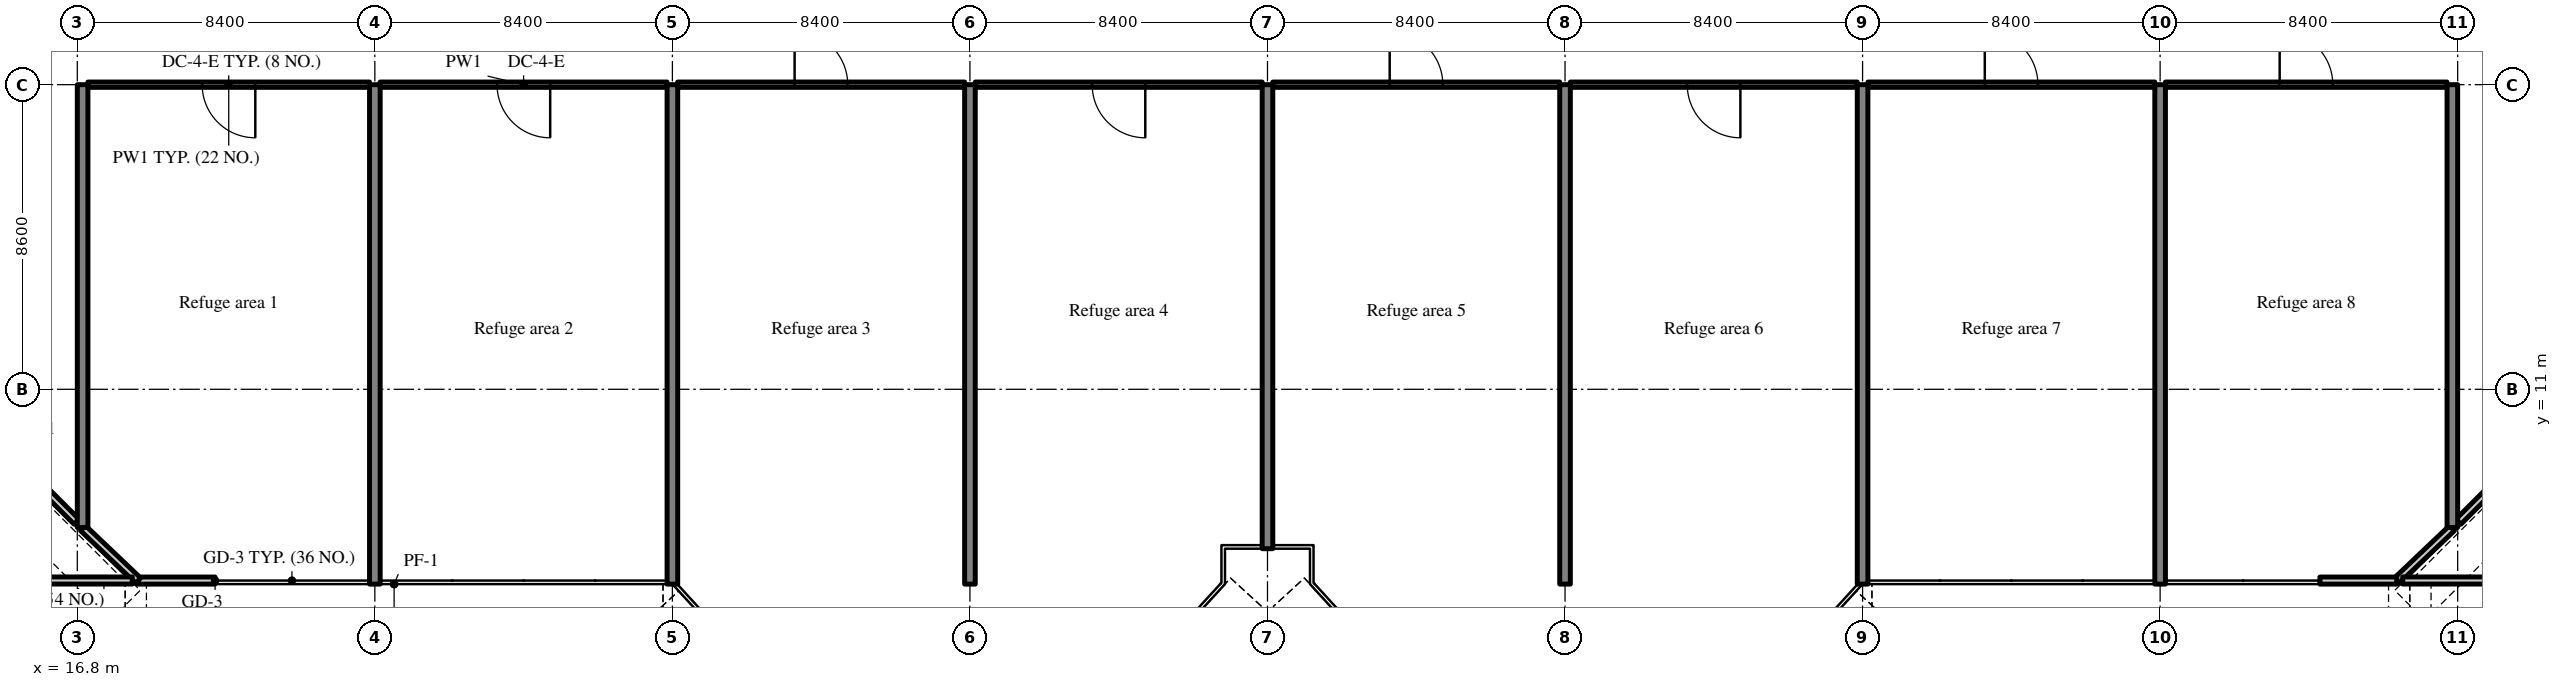
"""IFC4 building model, lengths in metres.
Left out: names, types, materials, properties, quantities, classifications, styles, units other than length and angle.
Written with IfcOpenShell. Run it as: python <this file> out.ifc"""

import sys

from ifc_helpers import new_model, si_unit, direction, frame, frame_2d, origin, place, context, subcontext, project, spatial, rectangle, extrude, source, transform, mapped, element, fill, save


model = new_model("IFC4")
c1 = context("Model", 3, precision=1e-05, world=origin(), true_north=direction((0.0, 1.0)))
c2 = subcontext(c1, "Body", "Model", "MODEL_VIEW")
j1 = project(units=[si_unit("LENGTHUNIT", "METRE"), si_unit("PLANEANGLEUNIT", "RADIAN")], contexts=[c1])
p1 = place(None, origin())
s1 = spatial("IfcSite", under=j1, at=p1, CompositionType="ELEMENT")
p2 = place(p1, origin())
s2 = spatial("IfcBuilding", under=s1, at=p2, CompositionType="ELEMENT")
p3 = place(p2, frame((0.0, 0.0, 206.4)))
s3 = spatial("IfcBuildingStorey", under=s2, at=p3, CompositionType="ELEMENT", Elevation=206.4)
m1 = source(origin(), c2, "Body", "SweptSolid", [
    extrude(rectangle(XDim=12.5, YDim=0.3, at=frame_2d((6.25, 0.0))), origin(), (0.0, 0.0, 1.0), 7.32),
])
p4 = place(p3, frame((16.95, 7.1, 0.0), z_axis=(0.0, 0.0, 1.0), x_axis=(0.0, 1.0, 0.0)))
e1 = element("IfcWall", 1, at=p4, inside=s3, PredefinedType="SHEAR", context=c2, shape_type="MappedRepresentation", body=[
    mapped(m1, transform((0.0, 0.0, 0.0), scale=1.0)),
])
m2 = source(origin(), c2, "Body", "SweptSolid", [
    extrude(rectangle(XDim=14.1, YDim=0.3, at=frame_2d((7.05, 0.0))), origin(), (0.0, 0.0, 1.0), 7.32),
])
for number, where, z_axis, x_axis in (
    (2, (25.2, 5.5, 0.0), (0.0, 0.0, 1.0), (0.0, 1.0, 0.0)),
    (3, (33.6, 5.5, 0.0), (0.0, 0.0, 1.0), (0.0, 1.0, 0.0)),
    (4, (42.0, 5.5, 0.0), (0.0, 0.0, 1.0), (0.0, 1.0, 0.0)),
):
    element("IfcWall", number, at=place(p3, frame(where, z_axis=z_axis, x_axis=x_axis)), inside=s3, PredefinedType="SHEAR", context=c2, shape_type="MappedRepresentation", body=[
        mapped(m2, transform((0.0, 0.0, 0.0), scale=1.0)),
    ])
m3 = source(origin(), c2, "Body", "SweptSolid", [
    extrude(rectangle(XDim=13.1, YDim=0.3, at=frame_2d((6.55, 0.0))), origin(), (0.0, 0.0, 1.0), 7.32),
])
p5 = place(p3, frame((50.4, 6.5, 0.0), z_axis=(0.0, 0.0, 1.0), x_axis=(0.0, 1.0, 0.0)))
e5 = element("IfcWall", 5, at=p5, inside=s3, PredefinedType="SHEAR", context=c2, shape_type="MappedRepresentation", body=[
    mapped(m3, transform((0.0, 0.0, 0.0), scale=1.0)),
])
for number, where, z_axis, x_axis in (
    (6, (58.8, 5.5, 0.0), (0.0, 0.0, 1.0), (0.0, 1.0, 0.0)),
    (7, (67.2, 5.5, 0.0), (0.0, 0.0, 1.0), (0.0, 1.0, 0.0)),
    (8, (75.6, 5.5, 0.0), (0.0, 0.0, 1.0), (0.0, 1.0, 0.0)),
):
    element("IfcWall", number, at=place(p3, frame(where, z_axis=z_axis, x_axis=x_axis)), inside=s3, PredefinedType="SHEAR", context=c2, shape_type="MappedRepresentation", body=[
        mapped(m2, transform((0.0, 0.0, 0.0), scale=1.0)),
    ])
p6 = place(p3, frame((83.85, 7.1, 0.0), z_axis=(0.0, 0.0, 1.0), x_axis=(0.0, 1.0, 0.0)))
e9 = element("IfcWall", 9, at=p6, inside=s3, PredefinedType="SHEAR", context=c2, shape_type="MappedRepresentation", body=[
    mapped(m1, transform((0.0, 0.0, 0.0), scale=1.0)),
])
m4 = source(origin(), c2, "Body", "SweptSolid", [
    extrude(rectangle(XDim=2.324, YDim=0.2, at=frame_2d((1.162, 0.0))), origin(), (0.0, 0.0, 1.0), 1.1),
])
p7 = place(p3, frame((16.78, 7.261, 0.0), z_axis=(0.0, 0.0, 1.0), x_axis=(-0.707106781187, 0.707106781187, 0.0)))
e10 = element("IfcWall", 10, at=p7, inside=s3, PredefinedType="PARAPET", context=c2, shape_type="MappedRepresentation", body=[
    mapped(m4, transform((0.0, 0.0, 0.0), scale=1.0)),
])
m5 = source(origin(), c2, "Body", "SweptSolid", [
    extrude(rectangle(XDim=2.17, YDim=0.2, at=frame_2d((1.085, 0.0))), origin(), (0.0, 0.0, 1.0), 1.1),
])
p8 = place(p3, frame((20.689, 5.6, 0.0), z_axis=(0.0, 0.0, 1.0), x_axis=(-1.0, 0.0, 0.0)))
e11 = element("IfcWall", 11, at=p8, inside=s3, PredefinedType="PARAPET", context=c2, shape_type="MappedRepresentation", body=[
    mapped(m5, transform((0.0, 0.0, 0.0), scale=1.0)),
])
m6 = source(origin(), c2, "Body", "SweptSolid", [
    extrude(rectangle(XDim=2.148, YDim=0.2, at=frame_2d((1.074, 0.0))), origin(), (0.0, 0.0, 1.0), 1.1),
])
for number, where, z_axis, x_axis in (
    (12, (18.519, 5.6, 0.0), (0.0, 0.0, 1.0), (-0.725, 0.689, 0.0)),
    (13, (83.839, 7.08, 0.0), (0.0, 0.0, 1.0), (-0.725, -0.689, 0.0)),
):
    element("IfcWall", number, at=place(p3, frame(where, z_axis=z_axis, x_axis=x_axis)), inside=s3, PredefinedType="PARAPET", context=c2, shape_type="MappedRepresentation", body=[
        mapped(m6, transform((0.0, 0.0, 0.0), scale=1.0)),
    ])
p9 = place(p3, frame((82.281, 5.6, 0.0), z_axis=(0.0, 0.0, 1.0), x_axis=(-1.0, 0.0, 0.0)))
e14 = element("IfcWall", 14, at=p9, inside=s3, PredefinedType="PARAPET", context=c2, shape_type="MappedRepresentation", body=[
    mapped(m5, transform((0.0, 0.0, 0.0), scale=1.0)),
])
p10 = place(p3, frame((85.664, 8.905, 0.0), z_axis=(0.0, 0.0, 1.0), x_axis=(-0.707106781187, -0.707106781187, 0.0)))
e15 = element("IfcWall", 15, at=p10, inside=s3, PredefinedType="PARAPET", context=c2, shape_type="MappedRepresentation", body=[
    mapped(m4, transform((0.0, 0.0, 0.0), scale=1.0)),
])
m7 = source(origin(), c2, "Body", "SweptSolid", [
    extrude(rectangle(XDim=5.909, YDim=0.2, at=frame_2d((2.955, 0.0))), origin(), (0.0, 0.0, 1.0), 1.1),
])
for number, where, z_axis, x_axis in (
    (16, (18.352, 5.602, -0.05), (0.0, 0.0, 1.0), (-1.0, 0.0, 0.0)),
    (17, (88.358, 5.602, -0.05), (0.0, 0.0, 1.0), (-1.0, 0.0, 0.0)),
):
    element("IfcWall", number, at=place(p3, frame(where, z_axis=z_axis, x_axis=x_axis)), inside=s3, PredefinedType="PARAPET", context=c2, shape_type="MappedRepresentation", body=[
        mapped(m7, transform((0.0, 0.0, 0.0), scale=1.0)),
    ])
m8 = source(origin(), c2, "Body", "SweptSolid", [
    extrude(rectangle(XDim=7.95, YDim=0.15, at=frame_2d((3.975, 0.0))), origin(), (0.0, 0.0, 1.0), 6.57),
])
p11 = place(p3, frame((17.1, 19.6, 0.0), z_axis=(0.0, 0.0, 1.0), x_axis=(1.0, 0.0, 0.0)))
e18 = element("IfcWall", 18, at=p11, inside=s3, PredefinedType="PARTITIONING", context=c2, shape_type="MappedRepresentation", body=[
    mapped(m8, transform((0.0, 0.0, 0.0), scale=1.0)),
])
m9 = source(origin(), c2, "Body", "SweptSolid", [
    extrude(rectangle(XDim=1.5, YDim=2.1, at=frame_2d((0.75, 1.05))), frame((0.0, 0.085, 0.0), z_axis=(0.0, -1.0, 0.0), x_axis=(1.0, 0.0, 0.0)), (0.0, 0.0, 1.0), 0.17),
])
p12 = place(p11, frame((3.225, 0.0, 0.0)))
e19 = element("IfcOpeningElement", 19, at=p12, cuts=e18, PredefinedType="OPENING", context=c2, shape_type="MappedRepresentation", body=[
    mapped(m9, transform((0.0, 0.0, 0.0), scale=1.0)),
])
m10 = source(origin(), c2, "Body", "SweptSolid", [
    extrude(rectangle(XDim=8.1, YDim=0.15, at=frame_2d((4.05, 0.0))), origin(), (0.0, 0.0, 1.0), 6.57),
])
p13 = place(p3, frame((25.35, 19.6, 0.0), z_axis=(0.0, 0.0, 1.0), x_axis=(1.0, 0.0, 0.0)))
e20 = element("IfcWall", 20, at=p13, inside=s3, PredefinedType="PARTITIONING", context=c2, shape_type="MappedRepresentation", body=[
    mapped(m10, transform((0.0, 0.0, 0.0), scale=1.0)),
])
p14 = place(p13, frame((3.3, 0.0, 0.0)))
e21 = element("IfcOpeningElement", 21, at=p14, cuts=e20, PredefinedType="OPENING", context=c2, shape_type="MappedRepresentation", body=[
    mapped(m9, transform((0.0, 0.0, 0.0), scale=1.0)),
])
m11 = source(origin(), c2, "Body", "SweptSolid", [
    extrude(rectangle(XDim=8.1, YDim=0.15, at=frame_2d((4.05, 0.0))), origin(), (0.0, 0.0, 1.0), 6.57),
])
p15 = place(p3, frame((33.75, 19.6, 0.0), z_axis=(0.0, 0.0, 1.0), x_axis=(1.0, 0.0, 0.0)))
e22 = element("IfcWall", 22, at=p15, inside=s3, PredefinedType="PARTITIONING", context=c2, shape_type="MappedRepresentation", body=[
    mapped(m11, transform((0.0, 0.0, 0.0), scale=1.0)),
])
p16 = place(p15, frame((3.3, 0.0, 0.0)))
e23 = element("IfcOpeningElement", 23, at=p16, cuts=e22, PredefinedType="OPENING", context=c2, shape_type="MappedRepresentation", body=[
    mapped(m9, transform((0.0, 0.0, 0.0), scale=1.0)),
])
p17 = place(p3, frame((42.15, 19.6, 0.0), z_axis=(0.0, 0.0, 1.0), x_axis=(1.0, 0.0, 0.0)))
e24 = element("IfcWall", 24, at=p17, inside=s3, PredefinedType="PARTITIONING", context=c2, shape_type="MappedRepresentation", body=[
    mapped(m11, transform((0.0, 0.0, 0.0), scale=1.0)),
])
p18 = place(p17, frame((3.3, 0.0, 0.0)))
e25 = element("IfcOpeningElement", 25, at=p18, cuts=e24, PredefinedType="OPENING", context=c2, shape_type="MappedRepresentation", body=[
    mapped(m9, transform((0.0, 0.0, 0.0), scale=1.0)),
])
p19 = place(p3, frame((50.55, 19.6, 0.0), z_axis=(0.0, 0.0, 1.0), x_axis=(1.0, 0.0, 0.0)))
e26 = element("IfcWall", 26, at=p19, inside=s3, PredefinedType="PARTITIONING", context=c2, shape_type="MappedRepresentation", body=[
    mapped(m10, transform((0.0, 0.0, 0.0), scale=1.0)),
])
p20 = place(p19, frame((3.3, 0.0, 0.0)))
e27 = element("IfcOpeningElement", 27, at=p20, cuts=e26, PredefinedType="OPENING", context=c2, shape_type="MappedRepresentation", body=[
    mapped(m9, transform((0.0, 0.0, 0.0), scale=1.0)),
])
p21 = place(p3, frame((58.95, 19.6, 0.0), z_axis=(0.0, 0.0, 1.0), x_axis=(1.0, 0.0, 0.0)))
e28 = element("IfcWall", 28, at=p21, inside=s3, PredefinedType="PARTITIONING", context=c2, shape_type="MappedRepresentation", body=[
    mapped(m11, transform((0.0, 0.0, 0.0), scale=1.0)),
])
p22 = place(p21, frame((3.3, 0.0, 0.0)))
e29 = element("IfcOpeningElement", 29, at=p22, cuts=e28, PredefinedType="OPENING", context=c2, shape_type="MappedRepresentation", body=[
    mapped(m9, transform((0.0, 0.0, 0.0), scale=1.0)),
])
p23 = place(p3, frame((67.35, 19.6, 0.0), z_axis=(0.0, 0.0, 1.0), x_axis=(1.0, 0.0, 0.0)))
e30 = element("IfcWall", 30, at=p23, inside=s3, PredefinedType="PARTITIONING", context=c2, shape_type="MappedRepresentation", body=[
    mapped(m10, transform((0.0, 0.0, 0.0), scale=1.0)),
])
p24 = place(p23, frame((3.3, 0.0, 0.0)))
e31 = element("IfcOpeningElement", 31, at=p24, cuts=e30, PredefinedType="OPENING", context=c2, shape_type="MappedRepresentation", body=[
    mapped(m9, transform((0.0, 0.0, 0.0), scale=1.0)),
])
p25 = place(p3, frame((75.75, 19.6, 0.0), z_axis=(0.0, 0.0, 1.0), x_axis=(1.0, 0.0, 0.0)))
e32 = element("IfcWall", 32, at=p25, inside=s3, PredefinedType="PARTITIONING", context=c2, shape_type="MappedRepresentation", body=[
    mapped(m8, transform((0.0, 0.0, 0.0), scale=1.0)),
])
p26 = place(p25, frame((3.225, 0.0, 0.0)))
e33 = element("IfcOpeningElement", 33, at=p26, cuts=e32, PredefinedType="OPENING", context=c2, shape_type="MappedRepresentation", body=[
    mapped(m9, transform((0.0, 0.0, 0.0), scale=1.0)),
])
m12 = source(origin(), c2, "Body", "SweptSolid", [
    extrude(rectangle(XDim=1.5, YDim=2.1, at=frame_2d((0.75, 1.05))), frame((0.0, 0.025, 0.0), z_axis=(0.0, -1.0, 0.0), x_axis=(1.0, 0.0, 0.0)), (0.0, 0.0, 1.0), 0.05),
])
p27 = place(p12, origin())
e34 = element("IfcDoor", 34, at=p27, inside=s3, OperationType="SINGLE_SWING_RIGHT", PredefinedType="DOOR", context=c2, shape_type="MappedRepresentation", body=[
    mapped(m12, transform((0.0, 0.0, 0.0), scale=1.0)),
])
fill(e19, e34)
p28 = place(p14, origin())
e35 = element("IfcDoor", 35, at=p28, inside=s3, OperationType="SINGLE_SWING_RIGHT", PredefinedType="DOOR", context=c2, shape_type="MappedRepresentation", body=[
    mapped(m12, transform((0.0, 0.0, 0.0), scale=1.0)),
])
fill(e21, e35)
p29 = place(p16, origin())
e36 = element("IfcDoor", 36, at=p29, inside=s3, OperationType="SINGLE_SWING_LEFT", PredefinedType="DOOR", context=c2, shape_type="MappedRepresentation", body=[
    mapped(m12, transform((0.0, 0.0, 0.0), scale=1.0)),
])
fill(e23, e36)
p30 = place(p18, origin())
e37 = element("IfcDoor", 37, at=p30, inside=s3, OperationType="SINGLE_SWING_RIGHT", PredefinedType="DOOR", context=c2, shape_type="MappedRepresentation", body=[
    mapped(m12, transform((0.0, 0.0, 0.0), scale=1.0)),
])
fill(e25, e37)
p31 = place(p20, origin())
e38 = element("IfcDoor", 38, at=p31, inside=s3, OperationType="SINGLE_SWING_LEFT", PredefinedType="DOOR", context=c2, shape_type="MappedRepresentation", body=[
    mapped(m12, transform((0.0, 0.0, 0.0), scale=1.0)),
])
fill(e27, e38)
p32 = place(p22, origin())
e39 = element("IfcDoor", 39, at=p32, inside=s3, OperationType="SINGLE_SWING_RIGHT", PredefinedType="DOOR", context=c2, shape_type="MappedRepresentation", body=[
    mapped(m12, transform((0.0, 0.0, 0.0), scale=1.0)),
])
fill(e29, e39)
p33 = place(p24, origin())
e40 = element("IfcDoor", 40, at=p33, inside=s3, OperationType="SINGLE_SWING_LEFT", PredefinedType="DOOR", context=c2, shape_type="MappedRepresentation", body=[
    mapped(m12, transform((0.0, 0.0, 0.0), scale=1.0)),
])
fill(e31, e40)
p34 = place(p26, origin())
e41 = element("IfcDoor", 41, at=p34, inside=s3, OperationType="SINGLE_SWING_LEFT", PredefinedType="DOOR", context=c2, shape_type="MappedRepresentation", body=[
    mapped(m12, transform((0.0, 0.0, 0.0), scale=1.0)),
])
fill(e33, e41)
save(model, sys.argv[1])
